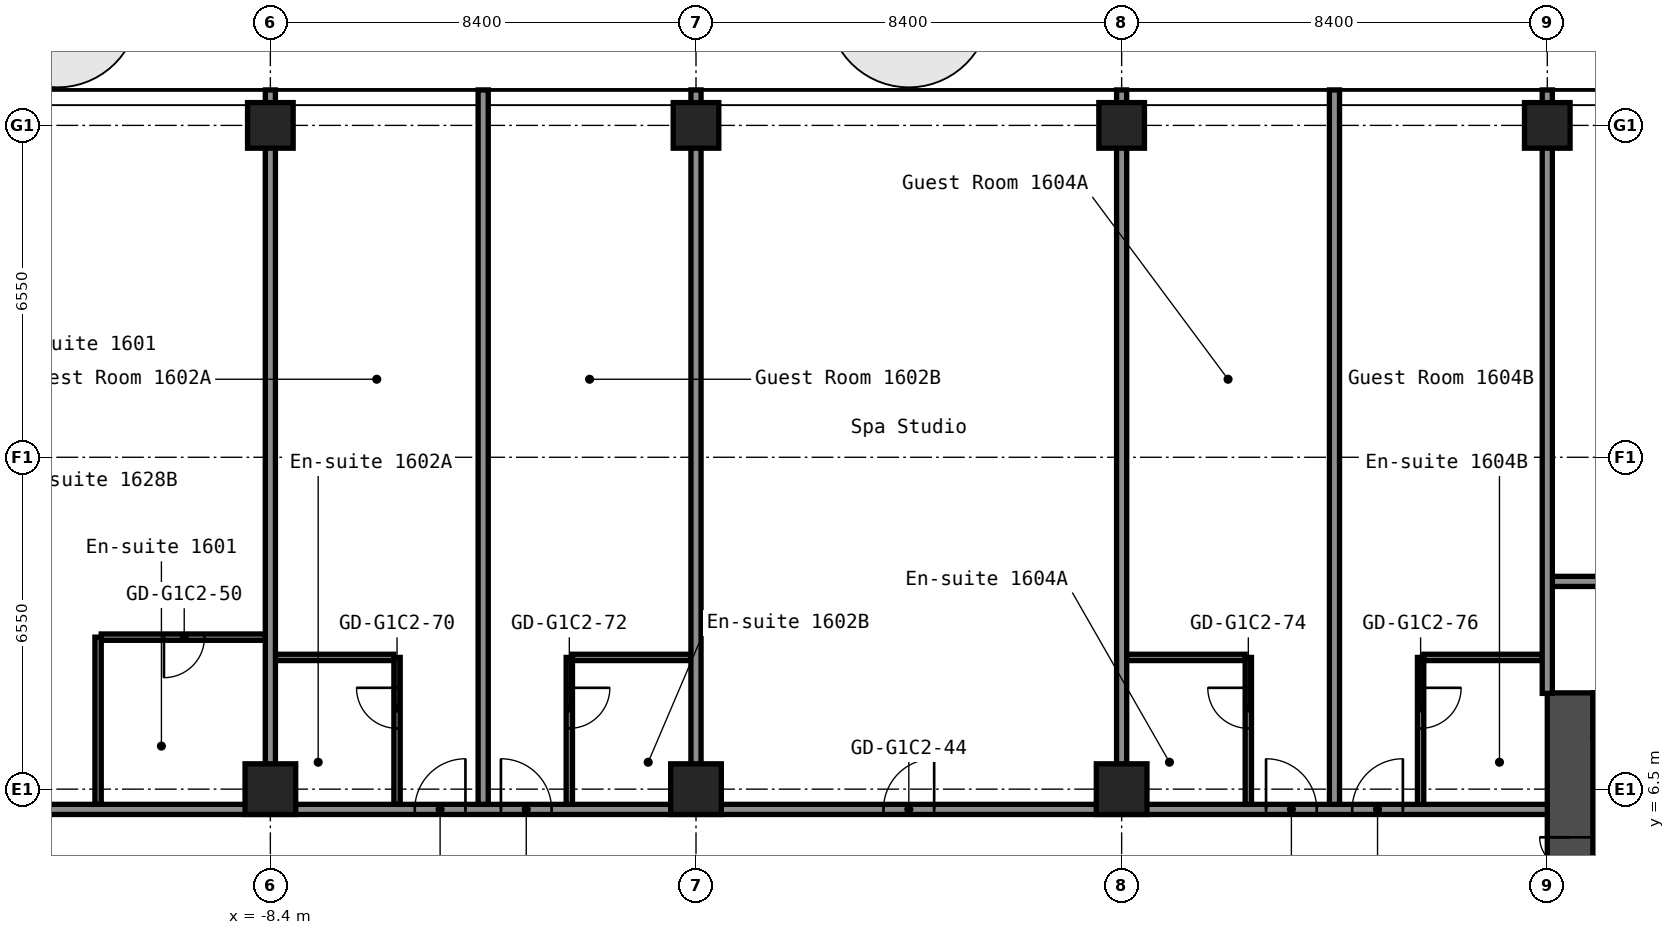
"""IFC4 building model, lengths in metres.
Left out: names, types, materials, properties, quantities, classifications, styles, units other than length and angle.
Written with IfcOpenShell. Run it as: python <this file> out.ifc"""

import sys

from ifc_helpers import new_model, si_unit, direction, frame, frame_2d, origin, origin_2d, place, context, subcontext, project, spatial, rectangle, hollow_rectangle, extrude, element, fill, save


model = new_model("IFC4")
c1 = context("Model", 3, precision=1e-05, world=origin(), true_north=direction((0.0, 1.0)))
c2 = subcontext(c1, "Body", "Model", "MODEL_VIEW")
j1 = project(units=[si_unit("LENGTHUNIT", "METRE"), si_unit("PLANEANGLEUNIT", "RADIAN")], contexts=[c1])
p1 = place(None, origin())
s1 = spatial("IfcSite", under=j1, at=p1, CompositionType="ELEMENT")
p2 = place(p1, origin())
s2 = spatial("IfcBuilding", under=s1, at=p2, CompositionType="ELEMENT")
p3 = place(p2, frame((0.0, 0.0, 58.2)))
s3 = spatial("IfcBuildingStorey", under=s2, at=p3, CompositionType="ELEMENT", Elevation=58.2)
p4 = place(p3, frame((-8.4, 6.5, 0.0), z_axis=(0.0, 0.0, 1.0), x_axis=(1.0, 0.0, 0.0)))
e1 = element("IfcColumn", 1, at=p4, inside=s3, PredefinedType="COLUMN", context=c2, shape_type="SweptSolid", body=[
    extrude(hollow_rectangle(XDim=1.0, YDim=1.0, WallThickness=0.04, at=origin_2d()), origin(), (0.0, 0.0, 1.0), 2.8),
])
p5 = place(p3, frame((-8.4, 19.6, 0.0), z_axis=(0.0, 0.0, 1.0), x_axis=(1.0, 0.0, 0.0)))
e2 = element("IfcColumn", 2, at=p5, inside=s3, PredefinedType="COLUMN", context=c2, shape_type="SweptSolid", body=[
    extrude(hollow_rectangle(XDim=0.9, YDim=0.9, WallThickness=0.036, at=origin_2d()), origin(), (0.0, 0.0, 1.0), 2.8),
])
p6 = place(p3, frame((0.0, 6.5, 0.0), z_axis=(0.0, 0.0, 1.0), x_axis=(1.0, 0.0, 0.0)))
e3 = element("IfcColumn", 3, at=p6, inside=s3, PredefinedType="COLUMN", context=c2, shape_type="SweptSolid", body=[
    extrude(hollow_rectangle(XDim=1.0, YDim=1.0, WallThickness=0.04, at=origin_2d()), origin(), (0.0, 0.0, 1.0), 2.8),
])
p7 = place(p3, frame((0.0, 19.6, 0.0), z_axis=(0.0, 0.0, 1.0), x_axis=(1.0, 0.0, 0.0)))
e4 = element("IfcColumn", 4, at=p7, inside=s3, PredefinedType="COLUMN", context=c2, shape_type="SweptSolid", body=[
    extrude(hollow_rectangle(XDim=0.9, YDim=0.9, WallThickness=0.036, at=origin_2d()), origin(), (0.0, 0.0, 1.0), 2.8),
])
p8 = place(p3, frame((8.4, 6.5, 0.0), z_axis=(0.0, 0.0, 1.0), x_axis=(1.0, 0.0, 0.0)))
e5 = element("IfcColumn", 5, at=p8, inside=s3, PredefinedType="COLUMN", context=c2, shape_type="SweptSolid", body=[
    extrude(hollow_rectangle(XDim=1.0, YDim=1.0, WallThickness=0.04, at=origin_2d()), origin(), (0.0, 0.0, 1.0), 2.8),
])
for number, where, z_axis, x_axis in (
    (6, (8.4, 19.6, 0.0), (0.0, 0.0, 1.0), (1.0, 0.0, 0.0)),
    (7, (16.8, 19.6, 0.0), (0.0, 0.0, 1.0), (1.0, 0.0, 0.0)),
):
    element("IfcColumn", number, at=place(p3, frame(where, z_axis=z_axis, x_axis=x_axis)), inside=s3, PredefinedType="COLUMN", context=c2, shape_type="SweptSolid", body=[
        extrude(hollow_rectangle(XDim=0.9, YDim=0.9, WallThickness=0.036, at=origin_2d()), origin(), (0.0, 0.0, 1.0), 2.8),
    ])
p9 = place(p3, frame((17.25, -8.4, 0.0), z_axis=(0.0, 0.0, 1.0), x_axis=(0.0, 1.0, 0.0)))
e8 = element("IfcWall", 8, at=p9, inside=s3, PredefinedType="SHEAR", context=c2, shape_type="SweptSolid", body=[
    extrude(rectangle(XDim=16.8, YDim=0.9, at=frame_2d((8.4, 0.0))), origin(), (0.0, 0.0, 1.0), 2.8),
])
p10 = place(p9, frame((12.75, 0.0, 0.0)))
e9 = element("IfcOpeningElement", 9, at=p10, cuts=e8, PredefinedType="OPENING", context=c2, shape_type="SweptSolid", body=[
    extrude(rectangle(XDim=1.2, YDim=2.1, at=frame_2d((0.6, 1.05))), frame((0.0, 0.46, 0.0), z_axis=(0.0, -1.0, 0.0), x_axis=(1.0, 0.0, 0.0)), (0.0, 0.0, 1.0), 0.92),
])
p11 = place(p9, frame((2.85, 0.0, 0.0)))
e10 = element("IfcOpeningElement", 10, at=p11, cuts=e8, PredefinedType="OPENING", context=c2, shape_type="SweptSolid", body=[
    extrude(rectangle(XDim=1.2, YDim=2.1, at=frame_2d((0.6, 1.05))), frame((0.0, 0.46, 0.0), z_axis=(0.0, -1.0, 0.0), x_axis=(1.0, 0.0, 0.0)), (0.0, 0.0, 1.0), 0.92),
])
p12 = place(p3, frame((17.7, 7.95, 0.0), z_axis=(0.0, 0.0, 1.0), x_axis=(1.0, 0.0, 0.0)))
e11 = element("IfcWall", 11, at=p12, inside=s3, PredefinedType="SHEAR", context=c2, shape_type="SweptSolid", body=[
    extrude(rectangle(XDim=15.0, YDim=0.9, at=frame_2d((7.5, 0.0))), origin(), (0.0, 0.0, 1.0), 2.8),
])
p13 = place(p12, frame((10.4, 0.0, 0.0)))
e12 = element("IfcOpeningElement", 12, at=p13, cuts=e11, PredefinedType="OPENING", context=c2, shape_type="SweptSolid", body=[
    extrude(rectangle(XDim=1.2, YDim=2.1, at=frame_2d((0.6, 1.05))), frame((0.0, 0.46, 0.0), z_axis=(0.0, -1.0, 0.0), x_axis=(1.0, 0.0, 0.0)), (0.0, 0.0, 1.0), 0.92),
])
p14 = place(p12, frame((13.35, 0.0, 0.0)))
e13 = element("IfcOpeningElement", 13, at=p14, cuts=e11, PredefinedType="OPENING", context=c2, shape_type="SweptSolid", body=[
    extrude(rectangle(XDim=0.9, YDim=2.1, at=frame_2d((0.45, 1.05))), frame((0.0, 0.46, 0.0), z_axis=(0.0, -1.0, 0.0), x_axis=(1.0, 0.0, 0.0)), (0.0, 0.0, 1.0), 0.92),
])
p15 = place(p3, frame((-16.8, 6.1, 0.0), z_axis=(0.0, 0.0, 1.0), x_axis=(1.0, 0.0, 0.0)))
e14 = element("IfcWall", 14, at=p15, inside=s3, PredefinedType="PARTITIONING", context=c2, shape_type="SweptSolid", body=[
    extrude(rectangle(XDim=33.6, YDim=0.2, at=frame_2d((16.8, 0.0))), origin(), (0.0, 0.0, 1.0), 2.8),
])
p16 = place(p15, frame((2.0, 0.0, 0.0)))
e15 = element("IfcOpeningElement", 15, at=p16, cuts=e14, PredefinedType="OPENING", context=c2, shape_type="SweptSolid", body=[
    extrude(rectangle(XDim=1.0, YDim=2.1, at=frame_2d((0.5, 1.05))), frame((0.0, 0.11, 0.0), z_axis=(0.0, -1.0, 0.0), x_axis=(1.0, 0.0, 0.0)), (0.0, 0.0, 1.0), 0.22),
])
p17 = place(p15, frame((11.25, 0.0, 0.0)))
e16 = element("IfcOpeningElement", 16, at=p17, cuts=e14, PredefinedType="OPENING", context=c2, shape_type="SweptSolid", body=[
    extrude(rectangle(XDim=1.0, YDim=2.1, at=frame_2d((0.5, 1.05))), frame((0.0, 0.11, 0.0), z_axis=(0.0, -1.0, 0.0), x_axis=(1.0, 0.0, 0.0)), (0.0, 0.0, 1.0), 0.22),
])
p18 = place(p15, frame((12.95, 0.0, 0.0)))
e17 = element("IfcOpeningElement", 17, at=p18, cuts=e14, PredefinedType="OPENING", context=c2, shape_type="SweptSolid", body=[
    extrude(rectangle(XDim=1.0, YDim=2.1, at=frame_2d((0.5, 1.05))), frame((0.0, 0.11, 0.0), z_axis=(0.0, -1.0, 0.0), x_axis=(1.0, 0.0, 0.0)), (0.0, 0.0, 1.0), 0.22),
])
p19 = place(p15, frame((20.5, 0.0, 0.0)))
e18 = element("IfcOpeningElement", 18, at=p19, cuts=e14, PredefinedType="OPENING", context=c2, shape_type="SweptSolid", body=[
    extrude(rectangle(XDim=1.0, YDim=2.1, at=frame_2d((0.5, 1.05))), frame((0.0, 0.11, 0.0), z_axis=(0.0, -1.0, 0.0), x_axis=(1.0, 0.0, 0.0)), (0.0, 0.0, 1.0), 0.22),
])
p20 = place(p15, frame((28.05, 0.0, 0.0)))
e19 = element("IfcOpeningElement", 19, at=p20, cuts=e14, PredefinedType="OPENING", context=c2, shape_type="SweptSolid", body=[
    extrude(rectangle(XDim=1.0, YDim=2.1, at=frame_2d((0.5, 1.05))), frame((0.0, 0.11, 0.0), z_axis=(0.0, -1.0, 0.0), x_axis=(1.0, 0.0, 0.0)), (0.0, 0.0, 1.0), 0.22),
])
p21 = place(p15, frame((29.75, 0.0, 0.0)))
e20 = element("IfcOpeningElement", 20, at=p21, cuts=e14, PredefinedType="OPENING", context=c2, shape_type="SweptSolid", body=[
    extrude(rectangle(XDim=1.0, YDim=2.1, at=frame_2d((0.5, 1.05))), frame((0.0, 0.11, 0.0), z_axis=(0.0, -1.0, 0.0), x_axis=(1.0, 0.0, 0.0)), (0.0, 0.0, 1.0), 0.22),
])
p22 = place(p3, frame((-8.3, 9.1, 0.0), z_axis=(0.0, 0.0, 1.0), x_axis=(1.0, 0.0, 0.0)))
e21 = element("IfcWall", 21, at=p22, inside=s3, PredefinedType="PARTITIONING", context=c2, shape_type="SweptSolid", body=[
    extrude(rectangle(XDim=2.338, YDim=0.125, at=frame_2d((1.169, 0.0))), origin(), (0.0, 0.0, 1.0), 2.8),
])
for number, where, z_axis, x_axis in (
    (22, (-2.438, 9.1, 0.0), (0.0, 0.0, 1.0), (1.0, 0.0, 0.0)),
    (23, (8.5, 9.1, 0.0), (0.0, 0.0, 1.0), (1.0, 0.0, 0.0)),
    (24, (14.363, 9.1, 0.0), (0.0, 0.0, 1.0), (1.0, 0.0, 0.0)),
):
    element("IfcWall", number, at=place(p3, frame(where, z_axis=z_axis, x_axis=x_axis)), inside=s3, PredefinedType="PARTITIONING", context=c2, shape_type="SweptSolid", body=[
        extrude(rectangle(XDim=2.337, YDim=0.125, at=frame_2d((1.169, 0.0))), origin(), (0.0, 0.0, 1.0), 2.8),
    ])
p23 = place(p3, frame((-11.738, 9.5, 0.0), z_axis=(0.0, 0.0, 1.0), x_axis=(1.0, 0.0, 0.0)))
e25 = element("IfcWall", 25, at=p23, inside=s3, PredefinedType="PARTITIONING", context=c2, shape_type="SweptSolid", body=[
    extrude(rectangle(XDim=3.238, YDim=0.125, at=frame_2d((1.619, 0.0))), origin(), (0.0, 0.0, 1.0), 2.8),
])
p24 = place(p23, frame((1.238, 0.0, 0.0)))
e26 = element("IfcOpeningElement", 26, at=p24, cuts=e25, PredefinedType="OPENING", context=c2, shape_type="SweptSolid", body=[
    extrude(rectangle(XDim=0.8, YDim=2.1, at=frame_2d((0.4, 1.05))), frame((0.0, 0.073, 0.0), z_axis=(0.0, -1.0, 0.0), x_axis=(1.0, 0.0, 0.0)), (0.0, 0.0, 1.0), 0.145),
])
p25 = place(p3, frame((16.8, 10.6, 0.0), z_axis=(0.0, 0.0, 1.0), x_axis=(1.0, 0.0, 0.0)))
e27 = element("IfcWall", 27, at=p25, inside=s3, PredefinedType="PARTITIONING", context=c2, shape_type="SweptSolid", body=[
    extrude(rectangle(XDim=34.3, YDim=0.2, at=frame_2d((17.15, 0.0))), origin(), (0.0, 0.0, 1.0), 2.8),
])
p26 = place(p25, frame((2.0, 0.0, 0.0)))
e28 = element("IfcOpeningElement", 28, at=p26, cuts=e27, PredefinedType="OPENING", context=c2, shape_type="SweptSolid", body=[
    extrude(rectangle(XDim=1.0, YDim=2.1, at=frame_2d((0.5, 1.05))), frame((0.0, 0.11, 0.0), z_axis=(0.0, -1.0, 0.0), x_axis=(1.0, 0.0, 0.0)), (0.0, 0.0, 1.0), 0.22),
])
p27 = place(p25, frame((11.25, 0.0, 0.0)))
e29 = element("IfcOpeningElement", 29, at=p27, cuts=e27, PredefinedType="OPENING", context=c2, shape_type="SweptSolid", body=[
    extrude(rectangle(XDim=1.0, YDim=2.1, at=frame_2d((0.5, 1.05))), frame((0.0, 0.11, 0.0), z_axis=(0.0, -1.0, 0.0), x_axis=(1.0, 0.0, 0.0)), (0.0, 0.0, 1.0), 0.22),
])
p28 = place(p25, frame((12.95, 0.0, 0.0)))
e30 = element("IfcOpeningElement", 30, at=p28, cuts=e27, PredefinedType="OPENING", context=c2, shape_type="SweptSolid", body=[
    extrude(rectangle(XDim=1.0, YDim=2.1, at=frame_2d((0.5, 1.05))), frame((0.0, 0.11, 0.0), z_axis=(0.0, -1.0, 0.0), x_axis=(1.0, 0.0, 0.0)), (0.0, 0.0, 1.0), 0.22),
])
p29 = place(p25, frame((18.8, 0.0, 0.0)))
e31 = element("IfcOpeningElement", 31, at=p29, cuts=e27, PredefinedType="OPENING", context=c2, shape_type="SweptSolid", body=[
    extrude(rectangle(XDim=1.0, YDim=2.1, at=frame_2d((0.5, 1.05))), frame((0.0, 0.11, 0.0), z_axis=(0.0, -1.0, 0.0), x_axis=(1.0, 0.0, 0.0)), (0.0, 0.0, 1.0), 0.22),
])
p30 = place(p25, frame((28.15, 0.0, 0.0)))
e32 = element("IfcOpeningElement", 32, at=p30, cuts=e27, PredefinedType="OPENING", context=c2, shape_type="SweptSolid", body=[
    extrude(rectangle(XDim=1.0, YDim=2.1, at=frame_2d((0.5, 1.05))), frame((0.0, 0.11, 0.0), z_axis=(0.0, -1.0, 0.0), x_axis=(1.0, 0.0, 0.0)), (0.0, 0.0, 1.0), 0.22),
])
p31 = place(p25, frame((30.05, 0.0, 0.0)))
e33 = element("IfcOpeningElement", 33, at=p31, cuts=e27, PredefinedType="OPENING", context=c2, shape_type="SweptSolid", body=[
    extrude(rectangle(XDim=1.0, YDim=2.1, at=frame_2d((0.5, 1.05))), frame((0.0, 0.11, 0.0), z_axis=(0.0, -1.0, 0.0), x_axis=(1.0, 0.0, 0.0)), (0.0, 0.0, 1.0), 0.22),
])
p32 = place(p3, frame((-11.8, 6.2, 0.0), z_axis=(0.0, 0.0, 1.0), x_axis=(0.0, 1.0, 0.0)))
e34 = element("IfcWall", 34, at=p32, inside=s3, PredefinedType="PARTITIONING", context=c2, shape_type="SweptSolid", body=[
    extrude(rectangle(XDim=3.3, YDim=0.125, at=frame_2d((1.65, 0.0))), origin(), (0.0, 0.0, 1.0), 2.8),
])
p33 = place(p3, frame((-8.4, 6.99, 0.0), z_axis=(0.0, 0.0, 1.0), x_axis=(0.0, 1.0, 0.0)))
e35 = element("IfcWall", 35, at=p33, inside=s3, PredefinedType="PARTITIONING", context=c2, shape_type="SweptSolid", body=[
    extrude(rectangle(XDim=13.31, YDim=0.2, at=frame_2d((6.655, 0.0))), origin(), (0.0, 0.0, 1.0), 2.8),
])
p34 = place(p3, frame((-5.9, 6.2, 0.0), z_axis=(0.0, 0.0, 1.0), x_axis=(0.0, 1.0, 0.0)))
e36 = element("IfcWall", 36, at=p34, inside=s3, PredefinedType="PARTITIONING", context=c2, shape_type="SweptSolid", body=[
    extrude(rectangle(XDim=2.9, YDim=0.125, at=frame_2d((1.45, 0.0))), origin(), (0.0, 0.0, 1.0), 2.8),
])
p35 = place(p34, frame((1.5, 0.0, 0.0)))
e37 = element("IfcOpeningElement", 37, at=p35, cuts=e36, PredefinedType="OPENING", context=c2, shape_type="SweptSolid", body=[
    extrude(rectangle(XDim=0.8, YDim=2.1, at=frame_2d((0.4, 1.05))), frame((0.0, 0.073, 0.0), z_axis=(0.0, -1.0, 0.0), x_axis=(1.0, 0.0, 0.0)), (0.0, 0.0, 1.0), 0.145),
])
p36 = place(p3, frame((-4.2, 6.2, 0.0), z_axis=(0.0, 0.0, 1.0), x_axis=(0.0, 1.0, 0.0)))
e38 = element("IfcWall", 38, at=p36, inside=s3, PredefinedType="PARTITIONING", context=c2, shape_type="SweptSolid", body=[
    extrude(rectangle(XDim=14.1, YDim=0.2, at=frame_2d((7.05, 0.0))), origin(), (0.0, 0.0, 1.0), 2.8),
])
p37 = place(p3, frame((-2.5, 6.2, 0.0), z_axis=(0.0, 0.0, 1.0), x_axis=(0.0, 1.0, 0.0)))
e39 = element("IfcWall", 39, at=p37, inside=s3, PredefinedType="PARTITIONING", context=c2, shape_type="SweptSolid", body=[
    extrude(rectangle(XDim=2.9, YDim=0.125, at=frame_2d((1.45, 0.0))), origin(), (0.0, 0.0, 1.0), 2.8),
])
p38 = place(p37, frame((1.5, 0.0, 0.0)))
e40 = element("IfcOpeningElement", 40, at=p38, cuts=e39, PredefinedType="OPENING", context=c2, shape_type="SweptSolid", body=[
    extrude(rectangle(XDim=0.8, YDim=2.1, at=frame_2d((0.4, 1.05))), frame((0.0, 0.073, 0.0), z_axis=(0.0, -1.0, 0.0), x_axis=(1.0, 0.0, 0.0)), (0.0, 0.0, 1.0), 0.145),
])
for number, where, z_axis, x_axis in (
    (41, (0.0, 6.99, 0.0), (0.0, 0.0, 1.0), (0.0, 1.0, 0.0)),
    (42, (8.4, 6.99, 0.0), (0.0, 0.0, 1.0), (0.0, 1.0, 0.0)),
):
    element("IfcWall", number, at=place(p3, frame(where, z_axis=z_axis, x_axis=x_axis)), inside=s3, PredefinedType="PARTITIONING", context=c2, shape_type="SweptSolid", body=[
        extrude(rectangle(XDim=13.31, YDim=0.2, at=frame_2d((6.655, 0.0))), origin(), (0.0, 0.0, 1.0), 2.8),
    ])
p39 = place(p3, frame((10.9, 6.2, 0.0), z_axis=(0.0, 0.0, 1.0), x_axis=(0.0, 1.0, 0.0)))
e43 = element("IfcWall", 43, at=p39, inside=s3, PredefinedType="PARTITIONING", context=c2, shape_type="SweptSolid", body=[
    extrude(rectangle(XDim=2.9, YDim=0.125, at=frame_2d((1.45, 0.0))), origin(), (0.0, 0.0, 1.0), 2.8),
])
p40 = place(p39, frame((1.5, 0.0, 0.0)))
e44 = element("IfcOpeningElement", 44, at=p40, cuts=e43, PredefinedType="OPENING", context=c2, shape_type="SweptSolid", body=[
    extrude(rectangle(XDim=0.8, YDim=2.1, at=frame_2d((0.4, 1.05))), frame((0.0, 0.073, 0.0), z_axis=(0.0, -1.0, 0.0), x_axis=(1.0, 0.0, 0.0)), (0.0, 0.0, 1.0), 0.145),
])
p41 = place(p3, frame((12.6, 6.2, 0.0), z_axis=(0.0, 0.0, 1.0), x_axis=(0.0, 1.0, 0.0)))
e45 = element("IfcWall", 45, at=p41, inside=s3, PredefinedType="PARTITIONING", context=c2, shape_type="SweptSolid", body=[
    extrude(rectangle(XDim=14.1, YDim=0.2, at=frame_2d((7.05, 0.0))), origin(), (0.0, 0.0, 1.0), 2.8),
])
p42 = place(p3, frame((14.3, 6.2, 0.0), z_axis=(0.0, 0.0, 1.0), x_axis=(0.0, 1.0, 0.0)))
e46 = element("IfcWall", 46, at=p42, inside=s3, PredefinedType="PARTITIONING", context=c2, shape_type="SweptSolid", body=[
    extrude(rectangle(XDim=2.9, YDim=0.125, at=frame_2d((1.45, 0.0))), origin(), (0.0, 0.0, 1.0), 2.8),
])
p43 = place(p42, frame((1.5, 0.0, 0.0)))
e47 = element("IfcOpeningElement", 47, at=p43, cuts=e46, PredefinedType="OPENING", context=c2, shape_type="SweptSolid", body=[
    extrude(rectangle(XDim=0.8, YDim=2.1, at=frame_2d((0.4, 1.05))), frame((0.0, 0.073, 0.0), z_axis=(0.0, -1.0, 0.0), x_axis=(1.0, 0.0, 0.0)), (0.0, 0.0, 1.0), 0.145),
])
p44 = place(p3, frame((16.8, 8.39, 0.0), z_axis=(0.0, 0.0, 1.0), x_axis=(0.0, 1.0, 0.0)))
e48 = element("IfcWall", 48, at=p44, inside=s3, PredefinedType="PARTITIONING", context=c2, shape_type="SweptSolid", body=[
    extrude(rectangle(XDim=11.91, YDim=0.2, at=frame_2d((5.955, 0.0))), origin(), (0.0, 0.0, 1.0), 2.8),
])
p45 = place(p10, origin())
e49 = element("IfcDoor", 49, at=p45, inside=s3, OperationType="DOUBLE_DOOR_SINGLE_SWING", PredefinedType="DOOR", context=c2, shape_type="SweptSolid", body=[
    extrude(rectangle(XDim=1.2, YDim=2.1, at=frame_2d((0.6, 1.05))), frame((0.0, 0.025, 0.0), z_axis=(0.0, -1.0, 0.0), x_axis=(1.0, 0.0, 0.0)), (0.0, 0.0, 1.0), 0.05),
])
fill(e9, e49)
p46 = place(p17, origin())
e50 = element("IfcDoor", 50, at=p46, inside=s3, OperationType="SINGLE_SWING_LEFT", PredefinedType="DOOR", context=c2, shape_type="SweptSolid", body=[
    extrude(rectangle(XDim=1.0, YDim=2.1, at=frame_2d((0.5, 1.05))), frame((0.0, 0.025, 0.0), z_axis=(0.0, -1.0, 0.0), x_axis=(1.0, 0.0, 0.0)), (0.0, 0.0, 1.0), 0.05),
])
fill(e16, e50)
p47 = place(p18, origin())
e51 = element("IfcDoor", 51, at=p47, inside=s3, OperationType="SINGLE_SWING_RIGHT", PredefinedType="DOOR", context=c2, shape_type="SweptSolid", body=[
    extrude(rectangle(XDim=1.0, YDim=2.1, at=frame_2d((0.5, 1.05))), frame((0.0, 0.025, 0.0), z_axis=(0.0, -1.0, 0.0), x_axis=(1.0, 0.0, 0.0)), (0.0, 0.0, 1.0), 0.05),
])
fill(e17, e51)
p48 = place(p19, origin())
e52 = element("IfcDoor", 52, at=p48, inside=s3, OperationType="SINGLE_SWING_LEFT", PredefinedType="DOOR", context=c2, shape_type="SweptSolid", body=[
    extrude(rectangle(XDim=1.0, YDim=2.1, at=frame_2d((0.5, 1.05))), frame((0.0, 0.025, 0.0), z_axis=(0.0, -1.0, 0.0), x_axis=(1.0, 0.0, 0.0)), (0.0, 0.0, 1.0), 0.05),
])
fill(e18, e52)
p49 = place(p20, origin())
e53 = element("IfcDoor", 53, at=p49, inside=s3, OperationType="SINGLE_SWING_RIGHT", PredefinedType="DOOR", context=c2, shape_type="SweptSolid", body=[
    extrude(rectangle(XDim=1.0, YDim=2.1, at=frame_2d((0.5, 1.05))), frame((0.0, 0.025, 0.0), z_axis=(0.0, -1.0, 0.0), x_axis=(1.0, 0.0, 0.0)), (0.0, 0.0, 1.0), 0.05),
])
fill(e19, e53)
p50 = place(p21, origin())
e54 = element("IfcDoor", 54, at=p50, inside=s3, OperationType="SINGLE_SWING_LEFT", PredefinedType="DOOR", context=c2, shape_type="SweptSolid", body=[
    extrude(rectangle(XDim=1.0, YDim=2.1, at=frame_2d((0.5, 1.05))), frame((0.0, 0.025, 0.0), z_axis=(0.0, -1.0, 0.0), x_axis=(1.0, 0.0, 0.0)), (0.0, 0.0, 1.0), 0.05),
])
fill(e20, e54)
p51 = place(p24, origin())
e55 = element("IfcDoor", 55, at=p51, inside=s3, OperationType="SINGLE_SWING_LEFT", PredefinedType="DOOR", context=c2, shape_type="SweptSolid", body=[
    extrude(rectangle(XDim=0.8, YDim=2.1, at=frame_2d((0.4, 1.05))), frame((0.0, 0.025, 0.0), z_axis=(0.0, -1.0, 0.0), x_axis=(1.0, 0.0, 0.0)), (0.0, 0.0, 1.0), 0.05),
])
fill(e26, e55)
p52 = place(p35, origin())
e56 = element("IfcDoor", 56, at=p52, inside=s3, OperationType="SINGLE_SWING_LEFT", PredefinedType="DOOR", context=c2, shape_type="SweptSolid", body=[
    extrude(rectangle(XDim=0.8, YDim=2.1, at=frame_2d((0.4, 1.05))), frame((0.0, 0.025, 0.0), z_axis=(0.0, -1.0, 0.0), x_axis=(1.0, 0.0, 0.0)), (0.0, 0.0, 1.0), 0.05),
])
fill(e37, e56)
p53 = place(p38, origin())
e57 = element("IfcDoor", 57, at=p53, inside=s3, OperationType="SINGLE_SWING_RIGHT", PredefinedType="DOOR", context=c2, shape_type="SweptSolid", body=[
    extrude(rectangle(XDim=0.8, YDim=2.1, at=frame_2d((0.4, 1.05))), frame((0.0, 0.025, 0.0), z_axis=(0.0, -1.0, 0.0), x_axis=(1.0, 0.0, 0.0)), (0.0, 0.0, 1.0), 0.05),
])
fill(e40, e57)
p54 = place(p40, origin())
e58 = element("IfcDoor", 58, at=p54, inside=s3, OperationType="SINGLE_SWING_LEFT", PredefinedType="DOOR", context=c2, shape_type="SweptSolid", body=[
    extrude(rectangle(XDim=0.8, YDim=2.1, at=frame_2d((0.4, 1.05))), frame((0.0, 0.025, 0.0), z_axis=(0.0, -1.0, 0.0), x_axis=(1.0, 0.0, 0.0)), (0.0, 0.0, 1.0), 0.05),
])
fill(e44, e58)
p55 = place(p43, origin())
e59 = element("IfcDoor", 59, at=p55, inside=s3, OperationType="SINGLE_SWING_RIGHT", PredefinedType="DOOR", context=c2, shape_type="SweptSolid", body=[
    extrude(rectangle(XDim=0.8, YDim=2.1, at=frame_2d((0.4, 1.05))), frame((0.0, 0.025, 0.0), z_axis=(0.0, -1.0, 0.0), x_axis=(1.0, 0.0, 0.0)), (0.0, 0.0, 1.0), 0.05),
])
fill(e47, e59)
save(model, sys.argv[1])
